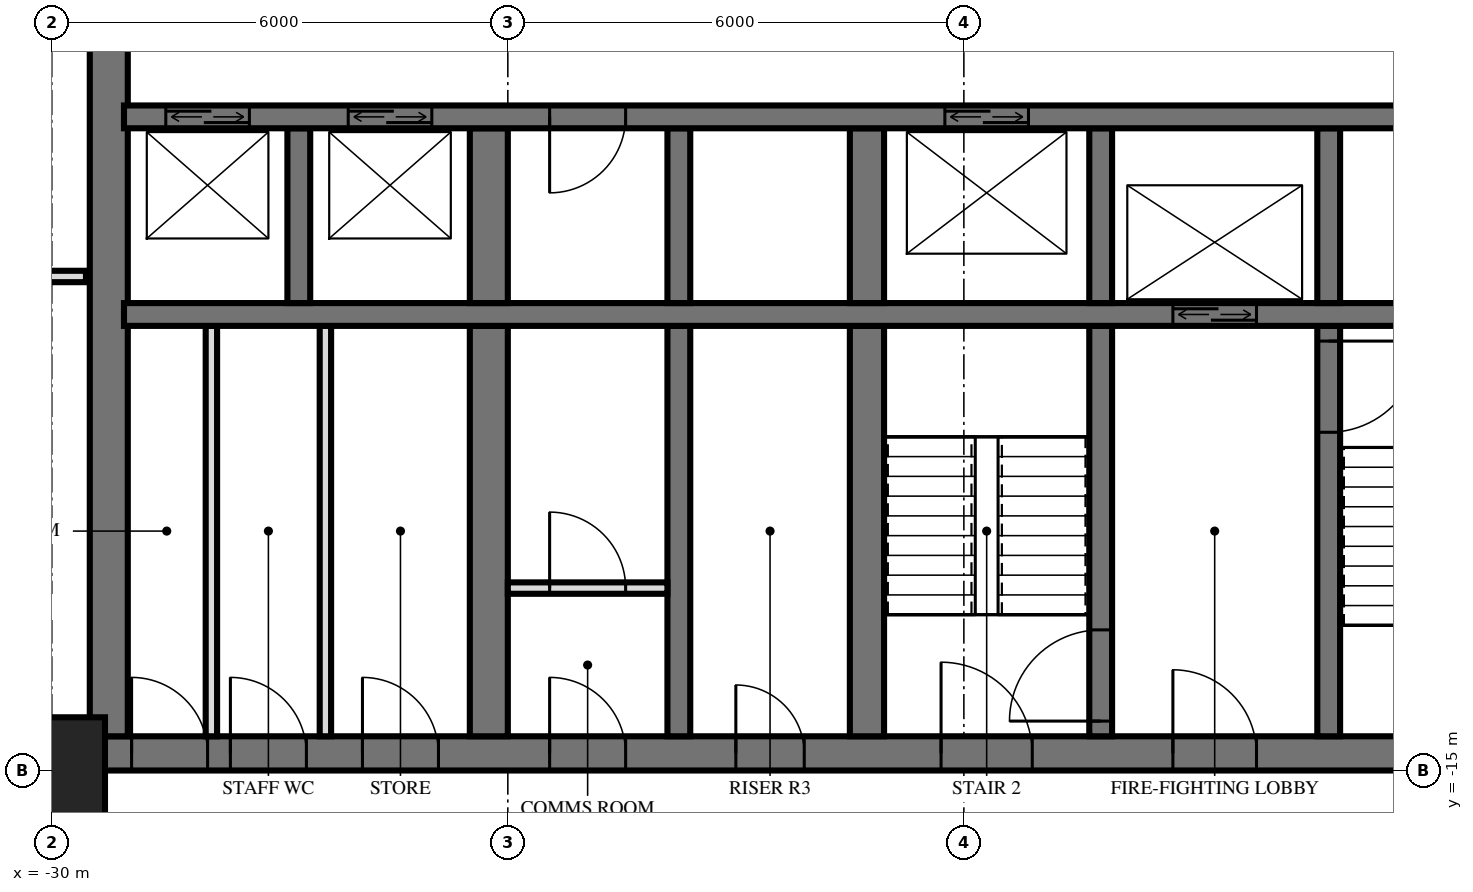
"""IFC4 building model, lengths in metres.
Left out: names, types, materials, properties, quantities, classifications, styles, units other than length and angle.
Written with IfcOpenShell. Run it as: python <this file> out.ifc"""

import sys

from ifc_helpers import new_model, si_unit, direction, frame, frame_2d, origin, origin_2d, place, context, subcontext, project, spatial, rectangle, extrude, element, fill, save


model = new_model("IFC4")
c1 = context("Model", 3, precision=1e-05, world=origin(), true_north=direction((0.0, 1.0)))
c2 = subcontext(c1, "Body", "Model", "MODEL_VIEW")
j1 = project(units=[si_unit("LENGTHUNIT", "METRE"), si_unit("PLANEANGLEUNIT", "RADIAN")], contexts=[c1])
p1 = place(None, origin())
s1 = spatial("IfcSite", under=j1, at=p1, CompositionType="ELEMENT")
p2 = place(p1, origin())
s2 = spatial("IfcBuilding", under=s1, at=p2, CompositionType="ELEMENT")
p3 = place(p2, frame((0.0, 0.0, 85.2)))
s3 = spatial("IfcBuildingStorey", under=s2, at=p3, CompositionType="ELEMENT", Elevation=85.2)
p4 = place(p3, frame((-30.0, -15.0, 0.0), z_axis=(0.0, 0.0, 1.0), x_axis=(1.0, 0.0, 0.0)))
e1 = element("IfcColumn", 1, at=p4, inside=s3, PredefinedType="COLUMN", context=c2, shape_type="SweptSolid", body=[
    extrude(rectangle(XDim=1.4, YDim=1.4, at=origin_2d()), origin(), (0.0, 0.0, 1.0), 3.6),
])
p5 = place(p3, frame((-29.5, -14.775, 0.0), z_axis=(0.0, 0.0, 1.0), x_axis=(1.0, 0.0, 0.0)))
e2 = element("IfcWall", 2, at=p5, inside=s3, PredefinedType="SHEAR", context=c2, shape_type="SweptSolid", body=[
    extrude(rectangle(XDim=19.5, YDim=0.45, at=frame_2d((9.75, 0.0))), origin(), (0.0, 0.0, 1.0), 3.6),
])
p6 = place(p5, frame((11.2, 0.0, 0.0)))
e3 = element("IfcOpeningElement", 3, at=p6, cuts=e2, PredefinedType="OPENING", context=c2, shape_type="SweptSolid", body=[
    extrude(rectangle(XDim=1.2, YDim=2.1, at=frame_2d((0.6, 1.05))), frame((0.0, 0.235, 0.0), z_axis=(0.0, -1.0, 0.0), x_axis=(1.0, 0.0, 0.0)), (0.0, 0.0, 1.0), 0.47),
])
p7 = place(p5, frame((14.25, 0.0, 0.0)))
e4 = element("IfcOpeningElement", 4, at=p7, cuts=e2, PredefinedType="OPENING", context=c2, shape_type="SweptSolid", body=[
    extrude(rectangle(XDim=1.1, YDim=2.1, at=frame_2d((0.55, 1.05))), frame((0.0, 0.235, 0.0), z_axis=(0.0, -1.0, 0.0), x_axis=(1.0, 0.0, 0.0)), (0.0, 0.0, 1.0), 0.47),
])
p8 = place(p5, frame((8.5, 0.0, 0.0)))
e5 = element("IfcOpeningElement", 5, at=p8, cuts=e2, PredefinedType="OPENING", context=c2, shape_type="SweptSolid", body=[
    extrude(rectangle(XDim=0.9, YDim=2.1, at=frame_2d((0.45, 1.05))), frame((0.0, 0.235, 0.0), z_axis=(0.0, -1.0, 0.0), x_axis=(1.0, 0.0, 0.0)), (0.0, 0.0, 1.0), 0.47),
])
p9 = place(p5, frame((6.05, 0.0, 0.0)))
e6 = element("IfcOpeningElement", 6, at=p9, cuts=e2, PredefinedType="OPENING", context=c2, shape_type="SweptSolid", body=[
    extrude(rectangle(XDim=1.0, YDim=2.1, at=frame_2d((0.5, 1.05))), frame((0.0, 0.235, 0.0), z_axis=(0.0, -1.0, 0.0), x_axis=(1.0, 0.0, 0.0)), (0.0, 0.0, 1.0), 0.47),
])
p10 = place(p5, frame((3.587, 0.0, 0.0)))
e7 = element("IfcOpeningElement", 7, at=p10, cuts=e2, PredefinedType="OPENING", context=c2, shape_type="SweptSolid", body=[
    extrude(rectangle(XDim=1.0, YDim=2.1, at=frame_2d((0.5, 1.05))), frame((0.0, 0.235, 0.0), z_axis=(0.0, -1.0, 0.0), x_axis=(1.0, 0.0, 0.0)), (0.0, 0.0, 1.0), 0.47),
])
p11 = place(p5, frame((1.85, 0.0, 0.0)))
e8 = element("IfcOpeningElement", 8, at=p11, cuts=e2, PredefinedType="OPENING", context=c2, shape_type="SweptSolid", body=[
    extrude(rectangle(XDim=1.0, YDim=2.1, at=frame_2d((0.5, 1.05))), frame((0.0, 0.235, 0.0), z_axis=(0.0, -1.0, 0.0), x_axis=(1.0, 0.0, 0.0)), (0.0, 0.0, 1.0), 0.47),
])
p12 = place(p5, frame((0.55, 0.0, 0.0)))
e9 = element("IfcOpeningElement", 9, at=p12, cuts=e2, PredefinedType="OPENING", context=c2, shape_type="SweptSolid", body=[
    extrude(rectangle(XDim=1.0, YDim=2.1, at=frame_2d((0.5, 1.05))), frame((0.0, 0.235, 0.0), z_axis=(0.0, -1.0, 0.0), x_axis=(1.0, 0.0, 0.0)), (0.0, 0.0, 1.0), 0.47),
])
p13 = place(p3, frame((-29.25, -14.55, 0.0), z_axis=(0.0, 0.0, 1.0), x_axis=(0.0, 1.0, 0.0)))
e10 = element("IfcWall", 10, at=p13, inside=s3, PredefinedType="SHEAR", context=c2, shape_type="SweptSolid", body=[
    extrude(rectangle(XDim=14.1, YDim=0.5, at=frame_2d((7.05, 0.0))), origin(), (0.0, 0.0, 1.0), 3.6),
])
p14 = place(p3, frame((-29.05, -6.4, 0.0), z_axis=(0.0, 0.0, 1.0), x_axis=(1.0, 0.0, 0.0)))
e11 = element("IfcWall", 11, at=p14, inside=s3, PredefinedType="SHEAR", context=c2, shape_type="SweptSolid", body=[
    extrude(rectangle(XDim=18.7, YDim=0.3, at=frame_2d((9.35, 0.0))), origin(), (0.0, 0.0, 1.0), 3.6),
])
p15 = place(p14, frame((2.95, 0.0, 0.0)))
e12 = element("IfcOpeningElement", 12, at=p15, cuts=e11, PredefinedType="OPENING", context=c2, shape_type="SweptSolid", body=[
    extrude(rectangle(XDim=1.1, YDim=2.1, at=frame_2d((0.55, 1.05))), frame((0.0, 0.16, 0.0), z_axis=(0.0, -1.0, 0.0), x_axis=(1.0, 0.0, 0.0)), (0.0, 0.0, 1.0), 0.32),
])
p16 = place(p14, frame((0.55, 0.0, 0.0)))
e13 = element("IfcOpeningElement", 13, at=p16, cuts=e11, PredefinedType="OPENING", context=c2, shape_type="SweptSolid", body=[
    extrude(rectangle(XDim=1.1, YDim=2.1, at=frame_2d((0.55, 1.05))), frame((0.0, 0.16, 0.0), z_axis=(0.0, -1.0, 0.0), x_axis=(1.0, 0.0, 0.0)), (0.0, 0.0, 1.0), 0.32),
])
p17 = place(p14, frame((10.8, 0.0, 0.0)))
e14 = element("IfcOpeningElement", 14, at=p17, cuts=e11, PredefinedType="OPENING", context=c2, shape_type="SweptSolid", body=[
    extrude(rectangle(XDim=1.1, YDim=2.1, at=frame_2d((0.55, 1.05))), frame((0.0, 0.16, 0.0), z_axis=(0.0, -1.0, 0.0), x_axis=(1.0, 0.0, 0.0)), (0.0, 0.0, 1.0), 0.32),
])
p18 = place(p14, frame((5.6, 0.0, 0.0)))
e15 = element("IfcOpeningElement", 15, at=p18, cuts=e11, PredefinedType="OPENING", context=c2, shape_type="SweptSolid", body=[
    extrude(rectangle(XDim=1.0, YDim=2.1, at=frame_2d((0.5, 1.05))), frame((0.0, 0.16, 0.0), z_axis=(0.0, -1.0, 0.0), x_axis=(1.0, 0.0, 0.0)), (0.0, 0.0, 1.0), 0.32),
])
p19 = place(p3, frame((-29.05, -9.0, 0.0), z_axis=(0.0, 0.0, 1.0), x_axis=(1.0, 0.0, 0.0)))
e16 = element("IfcWall", 16, at=p19, inside=s3, PredefinedType="SHEAR", context=c2, shape_type="SweptSolid", body=[
    extrude(rectangle(XDim=18.7, YDim=0.3, at=frame_2d((9.35, 0.0))), origin(), (0.0, 0.0, 1.0), 3.6),
])
p20 = place(p19, frame((13.8, 0.0, 0.0)))
e17 = element("IfcOpeningElement", 17, at=p20, cuts=e16, PredefinedType="OPENING", context=c2, shape_type="SweptSolid", body=[
    extrude(rectangle(XDim=1.1, YDim=2.1, at=frame_2d((0.55, 1.05))), frame((0.0, 0.16, 0.0), z_axis=(0.0, -1.0, 0.0), x_axis=(1.0, 0.0, 0.0)), (0.0, 0.0, 1.0), 0.32),
])
p21 = place(p3, frame((-13.2, -8.85, 0.0), z_axis=(0.0, 0.0, 1.0), x_axis=(0.0, 1.0, 0.0)))
e18 = element("IfcWall", 18, at=p21, inside=s3, PredefinedType="SHEAR", context=c2, shape_type="SweptSolid", body=[
    extrude(rectangle(XDim=2.3, YDim=0.3, at=frame_2d((1.15, 0.0))), origin(), (0.0, 0.0, 1.0), 3.6),
])
p22 = place(p3, frame((-13.2, -14.55, 0.0), z_axis=(0.0, 0.0, 1.0), x_axis=(0.0, 1.0, 0.0)))
e19 = element("IfcWall", 19, at=p22, inside=s3, PredefinedType="SHEAR", context=c2, shape_type="SweptSolid", body=[
    extrude(rectangle(XDim=5.4, YDim=0.3, at=frame_2d((2.7, 0.0))), origin(), (0.0, 0.0, 1.0), 3.6),
])
p23 = place(p22, frame((4.0, 0.0, 0.0)))
e20 = element("IfcOpeningElement", 20, at=p23, cuts=e19, PredefinedType="OPENING", context=c2, shape_type="SweptSolid", body=[
    extrude(rectangle(XDim=1.2, YDim=2.1, at=frame_2d((0.6, 1.05))), frame((0.0, 0.16, 0.0), z_axis=(0.0, -1.0, 0.0), x_axis=(1.0, 0.0, 0.0)), (0.0, 0.0, 1.0), 0.32),
])
p24 = place(p3, frame((-16.2, -8.85, 0.0), z_axis=(0.0, 0.0, 1.0), x_axis=(0.0, 1.0, 0.0)))
e21 = element("IfcWall", 21, at=p24, inside=s3, PredefinedType="SHEAR", context=c2, shape_type="SweptSolid", body=[
    extrude(rectangle(XDim=2.3, YDim=0.3, at=frame_2d((1.15, 0.0))), origin(), (0.0, 0.0, 1.0), 3.6),
])
p25 = place(p3, frame((-16.2, -14.55, 0.0), z_axis=(0.0, 0.0, 1.0), x_axis=(0.0, 1.0, 0.0)))
e22 = element("IfcWall", 22, at=p25, inside=s3, PredefinedType="SHEAR", context=c2, shape_type="SweptSolid", body=[
    extrude(rectangle(XDim=5.4, YDim=0.3, at=frame_2d((2.7, 0.0))), origin(), (0.0, 0.0, 1.0), 3.6),
])
p26 = place(p25, frame((0.2, 0.0, 0.0)))
e23 = element("IfcOpeningElement", 23, at=p26, cuts=e22, PredefinedType="OPENING", context=c2, shape_type="SweptSolid", body=[
    extrude(rectangle(XDim=1.2, YDim=2.1, at=frame_2d((0.6, 1.05))), frame((0.0, 0.16, 0.0), z_axis=(0.0, -1.0, 0.0), x_axis=(1.0, 0.0, 0.0)), (0.0, 0.0, 1.0), 0.32),
])
p27 = place(p3, frame((-19.275, -8.85, 0.0), z_axis=(0.0, 0.0, 1.0), x_axis=(0.0, 1.0, 0.0)))
e24 = element("IfcWall", 24, at=p27, inside=s3, PredefinedType="SHEAR", context=c2, shape_type="SweptSolid", body=[
    extrude(rectangle(XDim=2.3, YDim=0.45, at=frame_2d((1.15, 0.0))), origin(), (0.0, 0.0, 1.0), 3.6),
])
p28 = place(p3, frame((-19.275, -14.55, 0.0), z_axis=(0.0, 0.0, 1.0), x_axis=(0.0, 1.0, 0.0)))
e25 = element("IfcWall", 25, at=p28, inside=s3, PredefinedType="SHEAR", context=c2, shape_type="SweptSolid", body=[
    extrude(rectangle(XDim=5.4, YDim=0.45, at=frame_2d((2.7, 0.0))), origin(), (0.0, 0.0, 1.0), 3.6),
])
p29 = place(p3, frame((-21.75, -8.85, 0.0), z_axis=(0.0, 0.0, 1.0), x_axis=(0.0, 1.0, 0.0)))
e26 = element("IfcWall", 26, at=p29, inside=s3, PredefinedType="SHEAR", context=c2, shape_type="SweptSolid", body=[
    extrude(rectangle(XDim=2.3, YDim=0.3, at=frame_2d((1.15, 0.0))), origin(), (0.0, 0.0, 1.0), 3.6),
])
p30 = place(p3, frame((-21.75, -14.55, 0.0), z_axis=(0.0, 0.0, 1.0), x_axis=(0.0, 1.0, 0.0)))
e27 = element("IfcWall", 27, at=p30, inside=s3, PredefinedType="SHEAR", context=c2, shape_type="SweptSolid", body=[
    extrude(rectangle(XDim=5.4, YDim=0.3, at=frame_2d((2.7, 0.0))), origin(), (0.0, 0.0, 1.0), 3.6),
])
p31 = place(p3, frame((-24.25, -8.85, 0.0), z_axis=(0.0, 0.0, 1.0), x_axis=(0.0, 1.0, 0.0)))
e28 = element("IfcWall", 28, at=p31, inside=s3, PredefinedType="SHEAR", context=c2, shape_type="SweptSolid", body=[
    extrude(rectangle(XDim=2.3, YDim=0.5, at=frame_2d((1.15, 0.0))), origin(), (0.0, 0.0, 1.0), 3.6),
])
p32 = place(p3, frame((-24.25, -14.55, 0.0), z_axis=(0.0, 0.0, 1.0), x_axis=(0.0, 1.0, 0.0)))
e29 = element("IfcWall", 29, at=p32, inside=s3, PredefinedType="SHEAR", context=c2, shape_type="SweptSolid", body=[
    extrude(rectangle(XDim=5.4, YDim=0.5, at=frame_2d((2.7, 0.0))), origin(), (0.0, 0.0, 1.0), 3.6),
])
p33 = place(p3, frame((-26.75, -8.85, 0.0), z_axis=(0.0, 0.0, 1.0), x_axis=(0.0, 1.0, 0.0)))
e30 = element("IfcWall", 30, at=p33, inside=s3, PredefinedType="SHEAR", context=c2, shape_type="SweptSolid", body=[
    extrude(rectangle(XDim=2.3, YDim=0.3, at=frame_2d((1.15, 0.0))), origin(), (0.0, 0.0, 1.0), 3.6),
])
p34 = place(p3, frame((-24.0, -12.6, 0.0), z_axis=(0.0, 0.0, 1.0), x_axis=(1.0, 0.0, 0.0)))
e31 = element("IfcWall", 31, at=p34, inside=s3, PredefinedType="PARTITIONING", context=c2, shape_type="SweptSolid", body=[
    extrude(rectangle(XDim=2.1, YDim=0.15, at=frame_2d((1.05, 0.0))), origin(), (0.0, 0.0, 1.0), 3.3),
])
p35 = place(p34, frame((0.55, 0.0, 0.0)))
e32 = element("IfcOpeningElement", 32, at=p35, cuts=e31, PredefinedType="OPENING", context=c2, shape_type="SweptSolid", body=[
    extrude(rectangle(XDim=1.0, YDim=2.1, at=frame_2d((0.5, 1.05))), frame((0.0, 0.085, 0.0), z_axis=(0.0, -1.0, 0.0), x_axis=(1.0, 0.0, 0.0)), (0.0, 0.0, 1.0), 0.17),
])
for number, where, z_axis, x_axis in (
    (33, (-26.4, -14.55, 0.0), (0.0, 0.0, 1.0), (0.0, 1.0, 0.0)),
    (34, (-27.9, -14.55, 0.0), (0.0, 0.0, 1.0), (0.0, 1.0, 0.0)),
):
    element("IfcWall", number, at=place(p3, frame(where, z_axis=z_axis, x_axis=x_axis)), inside=s3, PredefinedType="PARTITIONING", context=c2, shape_type="SweptSolid", body=[
        extrude(rectangle(XDim=5.4, YDim=0.15, at=frame_2d((2.7, 0.0))), origin(), (0.0, 0.0, 1.0), 3.3),
    ])
p36 = place(p3, frame((-33.12, -15.0, 0.0), z_axis=(0.0, 0.0, 1.0), x_axis=(1.0, 0.0, 0.0)))
e35 = element("IfcWall", 35, at=p36, inside=s3, PredefinedType="PARTITIONING", context=c2, shape_type="SweptSolid", body=[
    extrude(rectangle(XDim=3.57, YDim=0.15, at=frame_2d((1.785, 0.0))), origin(), (0.0, 0.0, 1.0), 3.32),
])
p37 = place(p36, frame((1.58, 0.0, 0.0)))
e36 = element("IfcOpeningElement", 36, at=p37, cuts=e35, PredefinedType="OPENING", context=c2, shape_type="SweptSolid", body=[
    extrude(rectangle(XDim=0.8, YDim=2.1, at=frame_2d((0.4, 1.05))), frame((0.0, 0.085, 0.0), z_axis=(0.0, -1.0, 0.0), x_axis=(1.0, 0.0, 0.0)), (0.0, 0.0, 1.0), 0.17),
])
p38 = place(p3, frame((-33.12, -8.5, 0.0), z_axis=(0.0, 0.0, 1.0), x_axis=(1.0, 0.0, 0.0)))
e37 = element("IfcWall", 37, at=p38, inside=s3, PredefinedType="PARTITIONING", context=c2, shape_type="SweptSolid", body=[
    extrude(rectangle(XDim=3.57, YDim=0.15, at=frame_2d((1.785, 0.0))), origin(), (0.0, 0.0, 1.0), 3.32),
])
p39 = place(p38, frame((1.27, 0.0, 0.0)))
e38 = element("IfcOpeningElement", 38, at=p39, cuts=e37, PredefinedType="OPENING", context=c2, shape_type="SweptSolid", body=[
    extrude(rectangle(XDim=0.9, YDim=2.1, at=frame_2d((0.45, 1.05))), frame((0.0, 0.085, 0.0), z_axis=(0.0, -1.0, 0.0), x_axis=(1.0, 0.0, 0.0)), (0.0, 0.0, 1.0), 0.17),
])
p40 = place(p15, origin())
e39 = element("IfcDoor", 39, at=p40, inside=s3, OperationType="DOUBLE_DOOR_SLIDING", PredefinedType="USERDEFINED", context=c2, shape_type="SweptSolid", body=[
    extrude(rectangle(XDim=1.1, YDim=2.1, at=frame_2d((0.55, 1.05))), frame((0.0, 0.025, 0.0), z_axis=(0.0, -1.0, 0.0), x_axis=(1.0, 0.0, 0.0)), (0.0, 0.0, 1.0), 0.05),
])
fill(e12, e39)
p41 = place(p16, origin())
e40 = element("IfcDoor", 40, at=p41, inside=s3, OperationType="DOUBLE_DOOR_SLIDING", PredefinedType="USERDEFINED", context=c2, shape_type="SweptSolid", body=[
    extrude(rectangle(XDim=1.1, YDim=2.1, at=frame_2d((0.55, 1.05))), frame((0.0, 0.025, 0.0), z_axis=(0.0, -1.0, 0.0), x_axis=(1.0, 0.0, 0.0)), (0.0, 0.0, 1.0), 0.05),
])
fill(e13, e40)
p42 = place(p20, origin())
e41 = element("IfcDoor", 41, at=p42, inside=s3, OperationType="DOUBLE_DOOR_SLIDING", PredefinedType="USERDEFINED", context=c2, shape_type="SweptSolid", body=[
    extrude(rectangle(XDim=1.1, YDim=2.1, at=frame_2d((0.55, 1.05))), frame((0.0, 0.025, 0.0), z_axis=(0.0, -1.0, 0.0), x_axis=(1.0, 0.0, 0.0)), (0.0, 0.0, 1.0), 0.05),
])
fill(e17, e41)
p43 = place(p17, origin())
e42 = element("IfcDoor", 42, at=p43, inside=s3, OperationType="DOUBLE_DOOR_SLIDING", PredefinedType="USERDEFINED", context=c2, shape_type="SweptSolid", body=[
    extrude(rectangle(XDim=1.1, YDim=2.1, at=frame_2d((0.55, 1.05))), frame((0.0, 0.025, 0.0), z_axis=(0.0, -1.0, 0.0), x_axis=(1.0, 0.0, 0.0)), (0.0, 0.0, 1.0), 0.05),
])
fill(e14, e42)
p44 = place(p6, origin())
e43 = element("IfcDoor", 43, at=p44, inside=s3, OperationType="SINGLE_SWING_RIGHT", PredefinedType="DOOR", context=c2, shape_type="SweptSolid", body=[
    extrude(rectangle(XDim=1.2, YDim=2.1, at=frame_2d((0.6, 1.05))), frame((0.0, 0.025, 0.0), z_axis=(0.0, -1.0, 0.0), x_axis=(1.0, 0.0, 0.0)), (0.0, 0.0, 1.0), 0.05),
])
fill(e3, e43)
p45 = place(p7, origin())
e44 = element("IfcDoor", 44, at=p45, inside=s3, OperationType="SINGLE_SWING_RIGHT", PredefinedType="DOOR", context=c2, shape_type="SweptSolid", body=[
    extrude(rectangle(XDim=1.1, YDim=2.1, at=frame_2d((0.55, 1.05))), frame((0.0, 0.025, 0.0), z_axis=(0.0, -1.0, 0.0), x_axis=(1.0, 0.0, 0.0)), (0.0, 0.0, 1.0), 0.05),
])
fill(e4, e44)
p46 = place(p8, origin())
e45 = element("IfcDoor", 45, at=p46, inside=s3, OperationType="SINGLE_SWING_RIGHT", PredefinedType="DOOR", context=c2, shape_type="SweptSolid", body=[
    extrude(rectangle(XDim=0.9, YDim=2.1, at=frame_2d((0.45, 1.05))), frame((0.0, 0.025, 0.0), z_axis=(0.0, -1.0, 0.0), x_axis=(1.0, 0.0, 0.0)), (0.0, 0.0, 1.0), 0.05),
])
fill(e5, e45)
p47 = place(p9, origin())
e46 = element("IfcDoor", 46, at=p47, inside=s3, OperationType="SINGLE_SWING_RIGHT", PredefinedType="DOOR", context=c2, shape_type="SweptSolid", body=[
    extrude(rectangle(XDim=1.0, YDim=2.1, at=frame_2d((0.5, 1.05))), frame((0.0, 0.025, 0.0), z_axis=(0.0, -1.0, 0.0), x_axis=(1.0, 0.0, 0.0)), (0.0, 0.0, 1.0), 0.05),
])
fill(e6, e46)
p48 = place(p10, origin())
e47 = element("IfcDoor", 47, at=p48, inside=s3, OperationType="SINGLE_SWING_RIGHT", PredefinedType="DOOR", context=c2, shape_type="SweptSolid", body=[
    extrude(rectangle(XDim=1.0, YDim=2.1, at=frame_2d((0.5, 1.05))), frame((0.0, 0.025, 0.0), z_axis=(0.0, -1.0, 0.0), x_axis=(1.0, 0.0, 0.0)), (0.0, 0.0, 1.0), 0.05),
])
fill(e7, e47)
p49 = place(p11, origin())
e48 = element("IfcDoor", 48, at=p49, inside=s3, OperationType="SINGLE_SWING_RIGHT", PredefinedType="DOOR", context=c2, shape_type="SweptSolid", body=[
    extrude(rectangle(XDim=1.0, YDim=2.1, at=frame_2d((0.5, 1.05))), frame((0.0, 0.025, 0.0), z_axis=(0.0, -1.0, 0.0), x_axis=(1.0, 0.0, 0.0)), (0.0, 0.0, 1.0), 0.05),
])
fill(e8, e48)
p50 = place(p12, origin())
e49 = element("IfcDoor", 49, at=p50, inside=s3, OperationType="SINGLE_SWING_RIGHT", PredefinedType="DOOR", context=c2, shape_type="SweptSolid", body=[
    extrude(rectangle(XDim=1.0, YDim=2.1, at=frame_2d((0.5, 1.05))), frame((0.0, 0.025, 0.0), z_axis=(0.0, -1.0, 0.0), x_axis=(1.0, 0.0, 0.0)), (0.0, 0.0, 1.0), 0.05),
])
fill(e9, e49)
p51 = place(p18, frame((0.5, 0.0, 0.0), z_axis=(0.0, 0.0, 1.0), x_axis=(-1.0, 0.0, 0.0)))
e50 = element("IfcDoor", 50, at=p51, inside=s3, OperationType="SINGLE_SWING_LEFT", PredefinedType="DOOR", context=c2, shape_type="SweptSolid", body=[
    extrude(rectangle(XDim=1.0, YDim=2.1, at=frame_2d((0.0, 1.05))), frame((0.0, -0.025, 0.0), z_axis=(0.0, 1.0, 0.0), x_axis=(-1.0, 0.0, 0.0)), (0.0, 0.0, 1.0), 0.05),
])
fill(e15, e50)
p52 = place(p23, frame((0.6, 0.0, 0.0), z_axis=(0.0, 0.0, 1.0), x_axis=(-1.0, 0.0, 0.0)))
e51 = element("IfcDoor", 51, at=p52, inside=s3, OperationType="SINGLE_SWING_RIGHT", PredefinedType="DOOR", context=c2, shape_type="SweptSolid", body=[
    extrude(rectangle(XDim=1.2, YDim=2.1, at=frame_2d((0.0, 1.05))), frame((0.0, -0.025, 0.0), z_axis=(0.0, 1.0, 0.0), x_axis=(-1.0, 0.0, 0.0)), (0.0, 0.0, 1.0), 0.05),
])
fill(e20, e51)
p53 = place(p26, origin())
e52 = element("IfcDoor", 52, at=p53, inside=s3, OperationType="SINGLE_SWING_RIGHT", PredefinedType="DOOR", context=c2, shape_type="SweptSolid", body=[
    extrude(rectangle(XDim=1.2, YDim=2.1, at=frame_2d((0.6, 1.05))), frame((0.0, 0.025, 0.0), z_axis=(0.0, -1.0, 0.0), x_axis=(1.0, 0.0, 0.0)), (0.0, 0.0, 1.0), 0.05),
])
fill(e23, e52)
p54 = place(p35, origin())
e53 = element("IfcDoor", 53, at=p54, inside=s3, OperationType="SINGLE_SWING_RIGHT", PredefinedType="DOOR", context=c2, shape_type="SweptSolid", body=[
    extrude(rectangle(XDim=1.0, YDim=2.1, at=frame_2d((0.5, 1.05))), frame((0.0, 0.025, 0.0), z_axis=(0.0, -1.0, 0.0), x_axis=(1.0, 0.0, 0.0)), (0.0, 0.0, 1.0), 0.05),
])
fill(e32, e53)
save(model, sys.argv[1])
